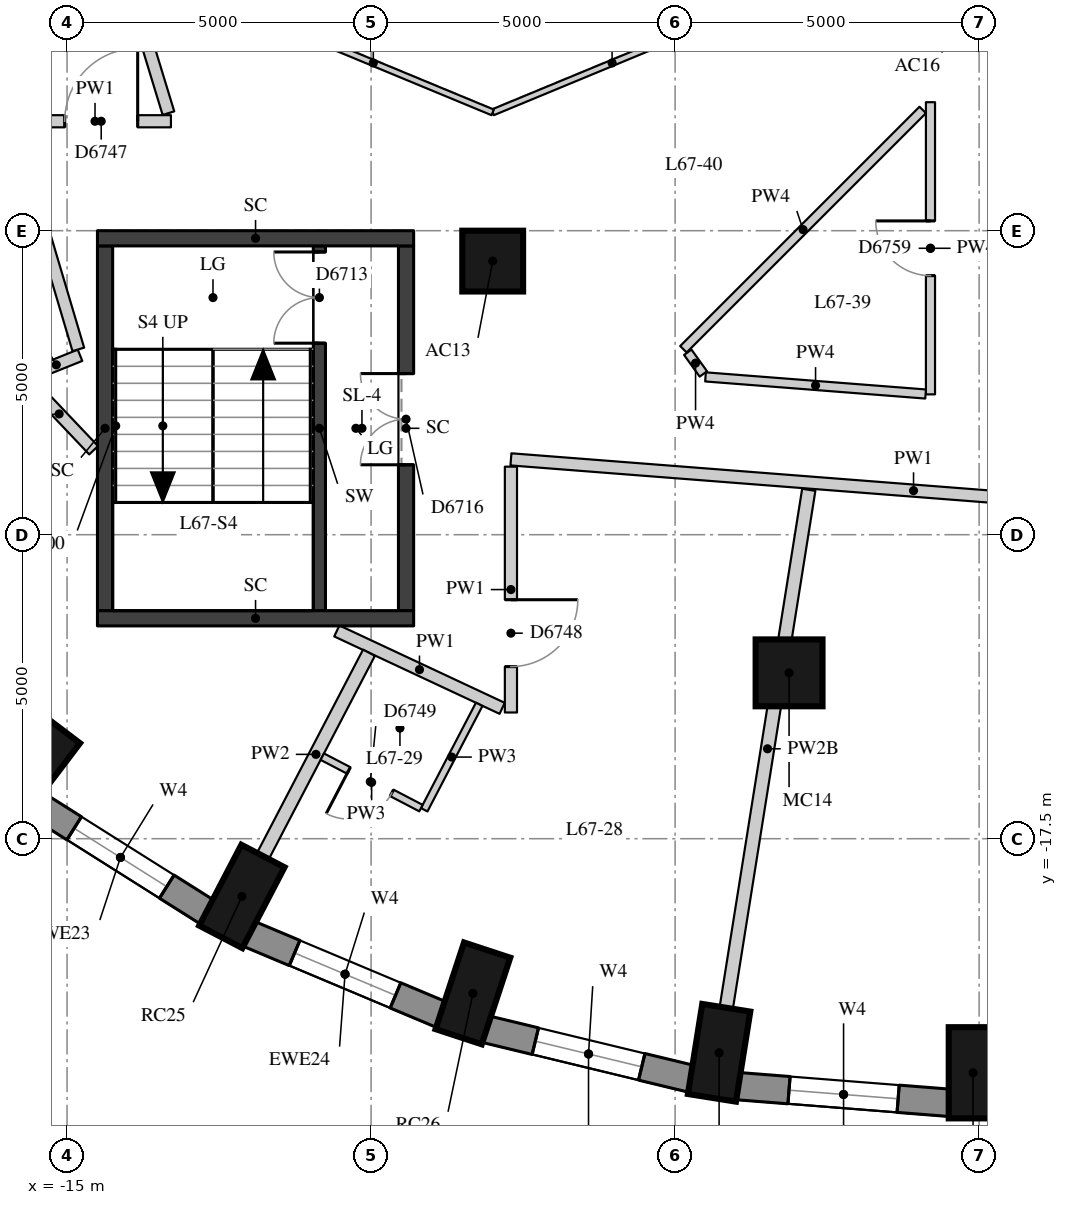
"""IFC4 building model, lengths in metres.
Left out: names, types, materials, properties, quantities, classifications, styles, units other than length and angle.
Written with IfcOpenShell. Run it as: python <this file> out.ifc"""

import sys

from ifc_helpers import new_model, si_unit, direction, frame, frame_2d, origin, origin_2d, place, context, subcontext, project, spatial, rectangle, extrude, element, fill, save


model = new_model("IFC4")
c1 = context("Model", 3, precision=1e-05, world=origin(), true_north=direction((0.0, 1.0)))
c2 = subcontext(c1, "Body", "Model", "MODEL_VIEW")
j1 = project(units=[si_unit("LENGTHUNIT", "METRE"), si_unit("PLANEANGLEUNIT", "RADIAN")], contexts=[c1])
p1 = place(None, origin())
s1 = spatial("IfcSite", under=j1, at=p1, CompositionType="ELEMENT")
p2 = place(p1, origin())
s2 = spatial("IfcBuilding", under=s1, at=p2, CompositionType="ELEMENT")
p3 = place(p2, frame((0.0, 0.0, 236.6)))
s3 = spatial("IfcBuildingStorey", under=s2, at=p3, CompositionType="ELEMENT", Elevation=236.6)
for number, where, z_axis, x_axis in (
    (1, (-15.559, -16.285, 0.0), (0.0, 0.0, 1.0), (-0.604, -0.797, 0.0)),
    (2, (-12.125, -18.449, 0.0), (0.0, 0.0, 1.0), (-0.462, -0.887, 0.0)),
    (3, (-8.326, -20.044, 0.0), (0.0, 0.0, 1.0), (-0.312, -0.95, 0.0)),
    (4, (-4.276, -21.021, 0.0), (0.0, 0.0, 1.0), (-0.157, -0.988, 0.0)),
    (5, (-0.1, -21.35, 0.0), (0.0, 0.0, 1.0), (0.0, -1.0, 0.0)),
):
    element("IfcColumn", number, at=place(p3, frame(where, z_axis=z_axis, x_axis=x_axis)), inside=s3, PredefinedType="COLUMN", context=c2, shape_type="SweptSolid", body=[
        extrude(rectangle(XDim=1.5, YDim=0.8, at=origin_2d()), origin(), (0.0, 0.0, 1.0), 3.3),
    ])
p4 = place(p3, frame((-8.0, -8.0, 0.0), z_axis=(0.0, 0.0, 1.0), x_axis=(1.0, 0.0, 0.0)))
e6 = element("IfcColumn", 6, at=p4, inside=s3, PredefinedType="COLUMN", context=c2, shape_type="SweptSolid", body=[
    extrude(rectangle(XDim=1.0, YDim=1.0, at=origin_2d()), origin(), (0.0, 0.0, 1.0), 3.3),
])
p5 = place(p3, frame((-3.126, -14.772, 0.0), z_axis=(0.0, 0.0, 1.0), x_axis=(1.0, 0.0, 0.0)))
e7 = element("IfcColumn", 7, at=p5, inside=s3, PredefinedType="COLUMN", context=c2, shape_type="SweptSolid", body=[
    extrude(rectangle(XDim=1.1, YDim=1.1, at=origin_2d()), origin(), (0.0, 0.0, 1.0), 3.3),
])
p6 = place(p3, frame((-15.553, -16.906, 0.0), z_axis=(0.0, 0.0, 1.0), x_axis=(0.845929139811, -0.53329531258, 0.0)))
e8 = element("IfcWall", 8, at=p6, inside=s3, PredefinedType="SOLIDWALL", context=c2, shape_type="SweptSolid", body=[
    extrude(rectangle(XDim=3.385, YDim=0.45, at=frame_2d((1.692, 0.0))), origin(), (0.0, 0.0, 1.0), 3.02),
])
p7 = place(p6, frame((0.792, 0.0, 0.4)))
e9 = element("IfcOpeningElement", 9, at=p7, cuts=e8, PredefinedType="OPENING", context=c2, shape_type="SweptSolid", body=[
    extrude(rectangle(XDim=1.8, YDim=1.75, at=frame_2d((0.9, 0.875))), frame((0.0, 0.235, 0.0), z_axis=(0.0, -1.0, 0.0), x_axis=(1.0, 0.0, 0.0)), (0.0, 0.0, 1.0), 0.47),
])
p8 = place(p3, frame((-12.016, -19.062, 0.0), z_axis=(0.0, 0.0, 1.0), x_axis=(0.922049934692, -0.3870709469, 0.0)))
e10 = element("IfcWall", 10, at=p8, inside=s3, PredefinedType="SOLIDWALL", context=c2, shape_type="SweptSolid", body=[
    extrude(rectangle(XDim=3.443, YDim=0.45, at=frame_2d((1.722, 0.0))), origin(), (0.0, 0.0, 1.0), 3.02),
])
p9 = place(p8, frame((0.822, 0.0, 0.4)))
e11 = element("IfcOpeningElement", 11, at=p9, cuts=e10, PredefinedType="OPENING", context=c2, shape_type="SweptSolid", body=[
    extrude(rectangle(XDim=1.8, YDim=1.75, at=frame_2d((0.9, 0.875))), frame((0.0, 0.235, 0.0), z_axis=(0.0, -1.0, 0.0), x_axis=(1.0, 0.0, 0.0)), (0.0, 0.0, 1.0), 0.47),
])
p10 = place(p3, frame((-8.119, -20.632, 0.0), z_axis=(0.0, 0.0, 1.0), x_axis=(0.972115243017, -0.234503633859, 0.0)))
e12 = element("IfcWall", 12, at=p10, inside=s3, PredefinedType="SOLIDWALL", context=c2, shape_type="SweptSolid", body=[
    extrude(rectangle(XDim=3.487, YDim=0.45, at=frame_2d((1.743, 0.0))), origin(), (0.0, 0.0, 1.0), 3.02),
])
p11 = place(p10, frame((0.843, 0.0, 0.4)))
e13 = element("IfcOpeningElement", 13, at=p11, cuts=e12, PredefinedType="OPENING", context=c2, shape_type="SweptSolid", body=[
    extrude(rectangle(XDim=1.8, YDim=1.75, at=frame_2d((0.9, 0.875))), frame((0.0, 0.235, 0.0), z_axis=(0.0, -1.0, 0.0), x_axis=(1.0, 0.0, 0.0)), (0.0, 0.0, 1.0), 0.47),
])
p12 = place(p3, frame((-3.979, -21.569, 0.0), z_axis=(0.0, 0.0, 1.0), x_axis=(0.996910775835, -0.078542377245, 0.0)))
e14 = element("IfcWall", 14, at=p12, inside=s3, PredefinedType="SOLIDWALL", context=c2, shape_type="SweptSolid", body=[
    extrude(rectangle(XDim=3.509, YDim=0.45, at=frame_2d((1.755, 0.0))), origin(), (0.0, 0.0, 1.0), 3.02),
])
p13 = place(p12, frame((0.855, 0.0, 0.4)))
e15 = element("IfcOpeningElement", 15, at=p13, cuts=e14, PredefinedType="OPENING", context=c2, shape_type="SweptSolid", body=[
    extrude(rectangle(XDim=1.8, YDim=1.75, at=frame_2d((0.9, 0.875))), frame((0.0, 0.235, 0.0), z_axis=(0.0, -1.0, 0.0), x_axis=(1.0, 0.0, 0.0)), (0.0, 0.0, 1.0), 0.47),
])
p14 = place(p3, frame((-10.85, -13.75, 0.0), z_axis=(0.0, 0.0, 1.0), x_axis=(0.0, 1.0, 0.0)))
e16 = element("IfcWall", 16, at=p14, inside=s3, PredefinedType="SHEAR", context=c2, shape_type="SweptSolid", body=[
    extrude(rectangle(XDim=6.0, YDim=0.2, at=frame_2d((3.0, 0.0))), origin(), (0.0, 0.0, 1.0), 3.02),
])
p15 = place(p14, frame((4.4, 0.0, 0.0)))
e17 = element("IfcOpeningElement", 17, at=p15, cuts=e16, PredefinedType="OPENING", context=c2, shape_type="SweptSolid", body=[
    extrude(rectangle(XDim=1.5, YDim=2.1, at=frame_2d((0.75, 1.05))), frame((0.0, 0.11, 0.0), z_axis=(0.0, -1.0, 0.0), x_axis=(1.0, 0.0, 0.0)), (0.0, 0.0, 1.0), 0.22),
])
p16 = place(p3, frame((-14.375, -13.75, -0.28), z_axis=(0.0, 0.0, 1.0), x_axis=(0.0, 1.0, 0.0)))
e18 = element("IfcWall", 18, at=p16, inside=s3, PredefinedType="SHEAR", context=c2, shape_type="SweptSolid", body=[
    extrude(rectangle(XDim=6.0, YDim=0.25, at=frame_2d((3.0, 0.0))), origin(), (0.0, 0.0, 1.0), 3.3),
])
p17 = place(p3, frame((-9.425, -13.75, -0.28), z_axis=(0.0, 0.0, 1.0), x_axis=(0.0, 1.0, 0.0)))
e19 = element("IfcWall", 19, at=p17, inside=s3, PredefinedType="SHEAR", context=c2, shape_type="SweptSolid", body=[
    extrude(rectangle(XDim=6.0, YDim=0.25, at=frame_2d((3.0, 0.0))), origin(), (0.0, 0.0, 1.0), 3.3),
])
p18 = place(p17, frame((2.4, 0.0, 0.28)))
e20 = element("IfcOpeningElement", 20, at=p18, cuts=e19, PredefinedType="OPENING", context=c2, shape_type="SweptSolid", body=[
    extrude(rectangle(XDim=1.5, YDim=2.1, at=frame_2d((0.75, 1.05))), frame((0.0, 0.135, 0.0), z_axis=(0.0, -1.0, 0.0), x_axis=(1.0, 0.0, 0.0)), (0.0, 0.0, 1.0), 0.27),
])
for number, where, z_axis, x_axis in (
    (21, (-14.5, -7.625, -0.28), (0.0, 0.0, 1.0), (1.0, 0.0, 0.0)),
    (22, (-14.5, -13.875, -0.28), (0.0, 0.0, 1.0), (1.0, 0.0, 0.0)),
):
    element("IfcWall", number, at=place(p3, frame(where, z_axis=z_axis, x_axis=x_axis)), inside=s3, PredefinedType="SHEAR", context=c2, shape_type="SweptSolid", body=[
        extrude(rectangle(XDim=5.2, YDim=0.25, at=frame_2d((2.6, 0.0))), origin(), (0.0, 0.0, 1.0), 3.3),
    ])
p19 = place(p3, frame((5.542, -12.29, 0.0), z_axis=(0.0, 0.0, 1.0), x_axis=(-0.996994281558, 0.077475173702, 0.0)))
e23 = element("IfcWall", 23, at=p19, inside=s3, PredefinedType="PARTITIONING", context=c2, shape_type="SweptSolid", body=[
    extrude(rectangle(XDim=13.282, YDim=0.2, at=frame_2d((6.641, 0.0))), origin(), (0.0, 0.0, 1.0), 3.02),
])
p20 = place(p19, frame((2.412, 0.0, 0.0)))
e24 = element("IfcOpeningElement", 24, at=p20, cuts=e23, PredefinedType="OPENING", context=c2, shape_type="SweptSolid", body=[
    extrude(rectangle(XDim=1.1, YDim=2.1, at=frame_2d((0.55, 1.05))), frame((0.0, 0.11, 0.0), z_axis=(0.0, -1.0, 0.0), x_axis=(1.0, 0.0, 0.0)), (0.0, 0.0, 1.0), 0.22),
])
p21 = place(p3, frame((-7.7, -11.381, 0.0), z_axis=(0.0, 0.0, 1.0), x_axis=(0.0, -1.0, 0.0)))
e25 = element("IfcWall", 25, at=p21, inside=s3, PredefinedType="PARTITIONING", context=c2, shape_type="SweptSolid", body=[
    extrude(rectangle(XDim=4.043, YDim=0.2, at=frame_2d((2.021, 0.0))), origin(), (0.0, 0.0, 1.0), 3.02),
])
p22 = place(p21, frame((2.189, 0.0, 0.0)))
e26 = element("IfcOpeningElement", 26, at=p22, cuts=e25, PredefinedType="OPENING", context=c2, shape_type="SweptSolid", body=[
    extrude(rectangle(XDim=1.1, YDim=2.1, at=frame_2d((0.55, 1.05))), frame((0.0, 0.11, 0.0), z_axis=(0.0, -1.0, 0.0), x_axis=(1.0, 0.0, 0.0)), (0.0, 0.0, 1.0), 0.22),
])
p23 = place(p3, frame((-7.844, -15.356, 0.0), z_axis=(0.0, 0.0, 1.0), x_axis=(-0.90567561184, 0.423971327001, 0.0)))
e27 = element("IfcWall", 27, at=p23, inside=s3, PredefinedType="PARTITIONING", context=c2, shape_type="SweptSolid", body=[
    extrude(rectangle(XDim=3.002, YDim=0.2, at=frame_2d((1.501, 0.0))), origin(), (0.0, 0.0, 1.0), 3.02),
])
p24 = place(p3, frame((-14.563, -11.111, 0.0), z_axis=(0.0, 0.0, 1.0), x_axis=(-0.688574238414, 0.725165855645, 0.0)))
e28 = element("IfcWall", 28, at=p24, inside=s3, PredefinedType="PARTITIONING", context=c2, shape_type="SweptSolid", body=[
    extrude(rectangle(XDim=1.648, YDim=0.2, at=frame_2d((0.824, 0.0))), origin(), (0.0, 0.0, 1.0), 3.02),
])
p25 = place(p3, frame((-15.568, -9.863, 0.0), z_axis=(0.0, 0.0, 1.0), x_axis=(0.92779485846, 0.373090740457, 0.0)))
e29 = element("IfcWall", 29, at=p25, inside=s3, PredefinedType="PARTITIONING", context=c2, shape_type="SweptSolid", body=[
    extrude(rectangle(XDim=0.842, YDim=0.2, at=frame_2d((0.421, 0.0))), origin(), (0.0, 0.0, 1.0), 3.02),
])
p26 = place(p3, frame((-14.815, -9.452, 0.0), z_axis=(0.0, 0.0, 1.0), x_axis=(-0.284600079658, 0.958646334504, 0.0)))
e30 = element("IfcWall", 30, at=p26, inside=s3, PredefinedType="PARTITIONING", context=c2, shape_type="SweptSolid", body=[
    extrude(rectangle(XDim=3.914, YDim=0.2, at=frame_2d((1.957, 0.0))), origin(), (0.0, 0.0, 1.0), 3.02),
])
p27 = place(p3, frame((-15.789, -5.7, 0.0), z_axis=(0.0, 0.0, 1.0), x_axis=(1.0, 0.0, 0.0)))
e31 = element("IfcWall", 31, at=p27, inside=s3, PredefinedType="PARTITIONING", context=c2, shape_type="SweptSolid", body=[
    extrude(rectangle(XDim=2.497, YDim=0.2, at=frame_2d((1.249, 0.0))), origin(), (0.0, 0.0, 1.0), 3.02),
])
p28 = place(p27, frame((0.75, 0.0, 0.0)))
e32 = element("IfcOpeningElement", 32, at=p28, cuts=e31, PredefinedType="OPENING", context=c2, shape_type="SweptSolid", body=[
    extrude(rectangle(XDim=1.2, YDim=2.1, at=frame_2d((0.6, 1.05))), frame((0.0, 0.11, 0.0), z_axis=(0.0, -1.0, 0.0), x_axis=(1.0, 0.0, 0.0)), (0.0, 0.0, 1.0), 0.22),
])
p29 = place(p3, frame((-13.333, -5.567, 0.0), z_axis=(0.0, 0.0, 1.0), x_axis=(-0.291732883234, 0.956499830026, 0.0)))
e33 = element("IfcWall", 33, at=p29, inside=s3, PredefinedType="PARTITIONING", context=c2, shape_type="SweptSolid", body=[
    extrude(rectangle(XDim=8.417, YDim=0.2, at=frame_2d((4.208, 0.0))), origin(), (0.0, 0.0, 1.0), 3.02),
])
p30 = place(p29, frame((4.053, 0.0, 0.0)))
e34 = element("IfcOpeningElement", 34, at=p30, cuts=e33, PredefinedType="OPENING", context=c2, shape_type="SweptSolid", body=[
    extrude(rectangle(XDim=1.2, YDim=2.1, at=frame_2d((0.6, 1.05))), frame((0.0, 0.11, 0.0), z_axis=(0.0, -1.0, 0.0), x_axis=(1.0, 0.0, 0.0)), (0.0, 0.0, 1.0), 0.22),
])
p31 = place(p3, frame((-0.8, -5.386, 0.0), z_axis=(0.0, 0.0, 1.0), x_axis=(0.0, -1.0, 0.0)))
e35 = element("IfcWall", 35, at=p31, inside=s3, PredefinedType="PARTITIONING", context=c2, shape_type="SweptSolid", body=[
    extrude(rectangle(XDim=4.805, YDim=0.15, at=frame_2d((2.403, 0.0))), origin(), (0.0, 0.0, 1.0), 3.02),
])
p32 = place(p31, frame((1.953, 0.0, 0.0)))
e36 = element("IfcOpeningElement", 36, at=p32, cuts=e35, PredefinedType="OPENING", context=c2, shape_type="SweptSolid", body=[
    extrude(rectangle(XDim=0.9, YDim=2.1, at=frame_2d((0.45, 1.05))), frame((0.0, 0.085, 0.0), z_axis=(0.0, -1.0, 0.0), x_axis=(1.0, 0.0, 0.0)), (0.0, 0.0, 1.0), 0.17),
])
p33 = place(p3, frame((-0.88, -10.186, 0.0), z_axis=(0.0, 0.0, 1.0), x_axis=(-0.996990060313, 0.077529475925, 0.0)))
e37 = element("IfcWall", 37, at=p33, inside=s3, PredefinedType="PARTITIONING", context=c2, shape_type="SweptSolid", body=[
    extrude(rectangle(XDim=3.631, YDim=0.15, at=frame_2d((1.815, 0.0))), origin(), (0.0, 0.0, 1.0), 3.02),
])
p34 = place(p3, frame((-4.535, -9.856, 0.0), z_axis=(0.0, 0.0, 1.0), x_axis=(-0.583807558681, 0.811892070676, 0.0)))
e38 = element("IfcWall", 38, at=p34, inside=s3, PredefinedType="PARTITIONING", context=c2, shape_type="SweptSolid", body=[
    extrude(rectangle(XDim=0.44, YDim=0.15, at=frame_2d((0.22, 0.0))), origin(), (0.0, 0.0, 1.0), 3.02),
])
p35 = place(p3, frame((-4.864, -9.45, 0.0), z_axis=(0.0, 0.0, 1.0), x_axis=(0.707106781187, 0.707106781187, 0.0)))
e39 = element("IfcWall", 39, at=p35, inside=s3, PredefinedType="PARTITIONING", context=c2, shape_type="SweptSolid", body=[
    extrude(rectangle(XDim=5.566, YDim=0.15, at=frame_2d((2.783, 0.0))), origin(), (0.0, 0.0, 1.0), 3.02),
])
p36 = place(p3, frame((-20.759, -6.295, 0.0), z_axis=(0.0, 0.0, 1.0), x_axis=(0.927536731172, 0.373732006023, 0.0)))
e40 = element("IfcWall", 40, at=p36, inside=s3, PredefinedType="PARTITIONING", context=c2, shape_type="SweptSolid", body=[
    extrude(rectangle(XDim=7.224, YDim=0.22, at=frame_2d((3.612, 0.0))), origin(), (0.0, 0.0, 1.0), 3.02),
])
p37 = place(p3, frame((-11.778, -17.784, 0.0), z_axis=(0.0, 0.0, 1.0), x_axis=(0.462428808932, 0.886656414103, 0.0)))
e41 = element("IfcWall", 41, at=p37, inside=s3, PredefinedType="PARTITIONING", context=c2, shape_type="SweptSolid", body=[
    extrude(rectangle(XDim=3.771, YDim=0.22, at=frame_2d((1.885, 0.0))), origin(), (0.0, 0.0, 1.0), 3.02),
])
p38 = place(p3, frame((-4.158, -20.281, 0.0), z_axis=(0.0, 0.0, 1.0), x_axis=(0.157248675007, 0.987559038341, 0.0)))
e42 = element("IfcWall", 42, at=p38, inside=s3, PredefinedType="PARTITIONING", context=c2, shape_type="SweptSolid", body=[
    extrude(rectangle(XDim=8.626, YDim=0.22, at=frame_2d((4.313, 0.0))), origin(), (0.0, 0.0, 1.0), 2.57),
])
p39 = place(p3, frame((-8.222, -15.29, 0.0), z_axis=(0.0, 0.0, 1.0), x_axis=(-0.46232711024, -0.886709446853, 0.0)))
e43 = element("IfcWall", 43, at=p39, inside=s3, PredefinedType="PARTITIONING", context=c2, shape_type="SweptSolid", body=[
    extrude(rectangle(XDim=1.956, YDim=0.12, at=frame_2d((0.978, 0.0))), origin(), (0.0, 0.0, 1.0), 3.02),
])
p40 = place(p3, frame((-9.18, -16.997, 0.0), z_axis=(0.0, 0.0, 1.0), x_axis=(-0.886720410479, 0.462306082201, 0.0)))
e44 = element("IfcWall", 44, at=p40, inside=s3, PredefinedType="PARTITIONING", context=c2, shape_type="SweptSolid", body=[
    extrude(rectangle(XDim=1.83, YDim=0.12, at=frame_2d((0.915, 0.0))), origin(), (0.0, 0.0, 1.0), 3.02),
])
p41 = place(p40, frame((0.54, 0.0, 0.0)))
e45 = element("IfcOpeningElement", 45, at=p41, cuts=e44, PredefinedType="OPENING", context=c2, shape_type="SweptSolid", body=[
    extrude(rectangle(XDim=0.8, YDim=2.1, at=frame_2d((0.4, 1.05))), frame((0.0, 0.07, 0.0), z_axis=(0.0, -1.0, 0.0), x_axis=(1.0, 0.0, 0.0)), (0.0, 0.0, 1.0), 0.14),
])
for number, where, z_axis, x_axis in (
    (46, (-4.073, -3.927, 0.0), (0.0, 0.0, 1.0), (-0.924, -0.383, 0.0)),
    (47, (-8.0, -5.554, 0.0), (0.0, 0.0, 1.0), (-0.924, 0.383, 0.0)),
):
    element("IfcWall", number, at=place(p3, frame(where, z_axis=z_axis, x_axis=x_axis)), inside=s3, PredefinedType="PARTITIONING", context=c2, shape_type="SweptSolid", body=[
        extrude(rectangle(XDim=4.251, YDim=0.1, at=frame_2d((2.125, 0.0))), origin(), (0.0, 0.0, 1.0), 3.02),
    ])
p42 = place(p7, origin())
e48 = element("IfcWindow", 48, at=p42, inside=s3, PartitioningType="SINGLE_PANEL", PredefinedType="WINDOW", context=c2, shape_type="SweptSolid", body=[
    extrude(rectangle(XDim=1.8, YDim=1.75, at=frame_2d((0.9, 0.875))), frame((0.0, 0.035, 0.0), z_axis=(0.0, -1.0, 0.0), x_axis=(1.0, 0.0, 0.0)), (0.0, 0.0, 1.0), 0.06),
])
fill(e9, e48)
p43 = place(p9, origin())
e49 = element("IfcWindow", 49, at=p43, inside=s3, PartitioningType="SINGLE_PANEL", PredefinedType="WINDOW", context=c2, shape_type="SweptSolid", body=[
    extrude(rectangle(XDim=1.8, YDim=1.75, at=frame_2d((0.9, 0.875))), frame((0.0, 0.035, 0.0), z_axis=(0.0, -1.0, 0.0), x_axis=(1.0, 0.0, 0.0)), (0.0, 0.0, 1.0), 0.06),
])
fill(e11, e49)
p44 = place(p11, origin())
e50 = element("IfcWindow", 50, at=p44, inside=s3, PartitioningType="SINGLE_PANEL", PredefinedType="WINDOW", context=c2, shape_type="SweptSolid", body=[
    extrude(rectangle(XDim=1.8, YDim=1.75, at=frame_2d((0.9, 0.875))), frame((0.0, 0.035, 0.0), z_axis=(0.0, -1.0, 0.0), x_axis=(1.0, 0.0, 0.0)), (0.0, 0.0, 1.0), 0.06),
])
fill(e13, e50)
p45 = place(p13, origin())
e51 = element("IfcWindow", 51, at=p45, inside=s3, PartitioningType="SINGLE_PANEL", PredefinedType="WINDOW", context=c2, shape_type="SweptSolid", body=[
    extrude(rectangle(XDim=1.8, YDim=1.75, at=frame_2d((0.9, 0.875))), frame((0.0, 0.035, 0.0), z_axis=(0.0, -1.0, 0.0), x_axis=(1.0, 0.0, 0.0)), (0.0, 0.0, 1.0), 0.06),
])
fill(e15, e51)
p46 = place(p15, origin())
e52 = element("IfcDoor", 52, at=p46, inside=s3, OperationType="DOUBLE_DOOR_SINGLE_SWING", PredefinedType="DOOR", context=c2, shape_type="SweptSolid", body=[
    extrude(rectangle(XDim=1.5, YDim=2.1, at=frame_2d((0.75, 1.05))), frame((0.0, 0.025, 0.0), z_axis=(0.0, -1.0, 0.0), x_axis=(1.0, 0.0, 0.0)), (0.0, 0.0, 1.0), 0.05),
])
fill(e17, e52)
p47 = place(p18, origin())
e53 = element("IfcDoor", 53, at=p47, inside=s3, OperationType="DOUBLE_DOOR_SINGLE_SWING", PredefinedType="DOOR", context=c2, shape_type="SweptSolid", body=[
    extrude(rectangle(XDim=1.5, YDim=2.1, at=frame_2d((0.75, 1.05))), frame((0.0, 0.025, 0.0), z_axis=(0.0, -1.0, 0.0), x_axis=(1.0, 0.0, 0.0)), (0.0, 0.0, 1.0), 0.05),
])
fill(e20, e53)
p48 = place(p28, origin())
e54 = element("IfcDoor", 54, at=p48, inside=s3, OperationType="SINGLE_SWING_RIGHT", PredefinedType="DOOR", context=c2, shape_type="SweptSolid", body=[
    extrude(rectangle(XDim=1.2, YDim=2.1, at=frame_2d((0.6, 1.05))), frame((0.0, 0.025, 0.0), z_axis=(0.0, -1.0, 0.0), x_axis=(1.0, 0.0, 0.0)), (0.0, 0.0, 1.0), 0.05),
])
fill(e32, e54)
p49 = place(p22, origin())
e55 = element("IfcDoor", 55, at=p49, inside=s3, OperationType="SINGLE_SWING_LEFT", PredefinedType="DOOR", context=c2, shape_type="SweptSolid", body=[
    extrude(rectangle(XDim=1.1, YDim=2.1, at=frame_2d((0.55, 1.05))), frame((0.0, 0.025, 0.0), z_axis=(0.0, -1.0, 0.0), x_axis=(1.0, 0.0, 0.0)), (0.0, 0.0, 1.0), 0.05),
])
fill(e26, e55)
p50 = place(p41, origin())
e56 = element("IfcDoor", 56, at=p50, inside=s3, OperationType="SINGLE_SWING_RIGHT", PredefinedType="DOOR", context=c2, shape_type="SweptSolid", body=[
    extrude(rectangle(XDim=0.8, YDim=2.1, at=frame_2d((0.4, 1.05))), frame((0.0, 0.025, 0.0), z_axis=(0.0, -1.0, 0.0), x_axis=(1.0, 0.0, 0.0)), (0.0, 0.0, 1.0), 0.05),
])
fill(e45, e56)
p51 = place(p32, origin())
e57 = element("IfcDoor", 57, at=p51, inside=s3, OperationType="SINGLE_SWING_RIGHT", PredefinedType="DOOR", context=c2, shape_type="SweptSolid", body=[
    extrude(rectangle(XDim=0.9, YDim=2.1, at=frame_2d((0.45, 1.05))), frame((0.0, 0.025, 0.0), z_axis=(0.0, -1.0, 0.0), x_axis=(1.0, 0.0, 0.0)), (0.0, 0.0, 1.0), 0.05),
])
fill(e36, e57)
save(model, sys.argv[1])
